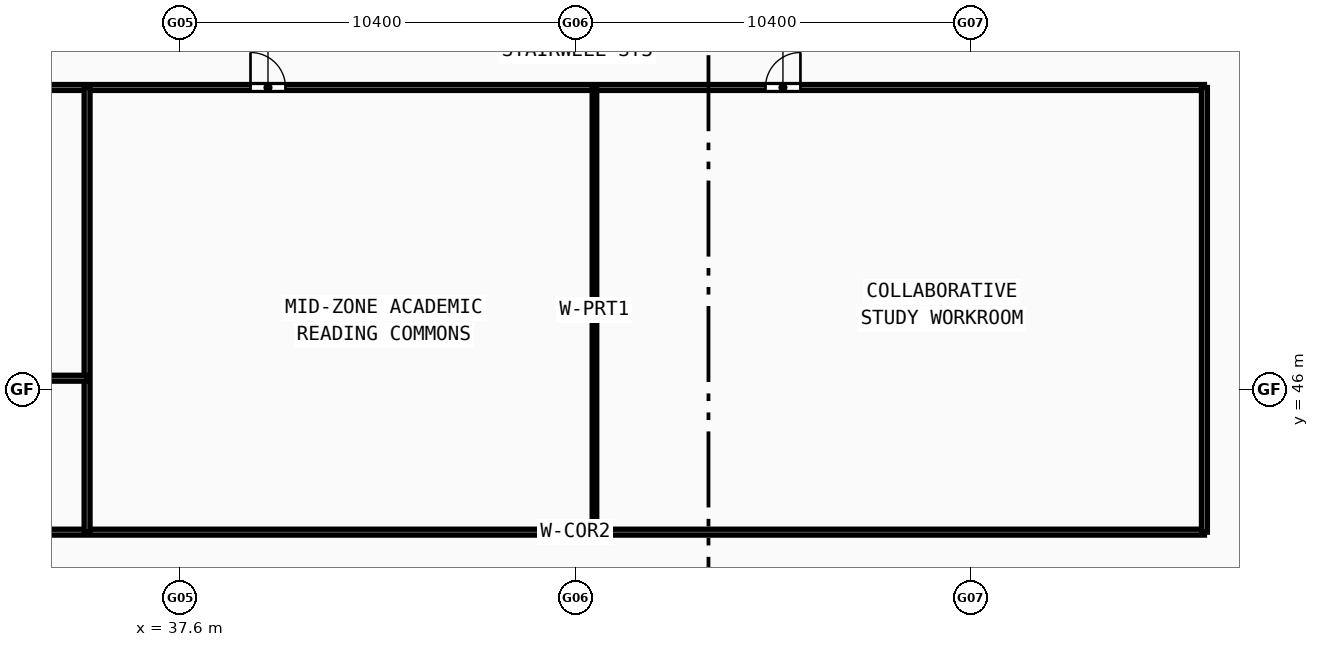
"""IFC4 building model, lengths in metres.
Left out: names, types, materials, properties, quantities, classifications, styles, units other than length and angle.
Written with IfcOpenShell. Run it as: python <this file> out.ifc"""

import sys

from ifc_helpers import new_model, si_unit, direction, frame, frame_2d, origin, origin_with_axes, place, context, subcontext, project, spatial, rectangle, extrude, source, transform, mapped, element, fill, save


model = new_model("IFC4")
c1 = context("Model", 3, precision=1e-05, world=origin(), true_north=direction((0.0, 1.0)))
c2 = subcontext(c1, "Body", "Model", "MODEL_VIEW")
j1 = project(units=[si_unit("LENGTHUNIT", "METRE"), si_unit("PLANEANGLEUNIT", "RADIAN")], contexts=[c1])
p1 = place(None, origin())
s1 = spatial("IfcSite", under=j1, at=p1, CompositionType="ELEMENT")
p2 = place(p1, origin())
s2 = spatial("IfcBuilding", under=s1, at=p2, CompositionType="ELEMENT")
p3 = place(p2, frame((0.0, 0.0, 188.56)))
s3 = spatial("IfcBuildingStorey", under=s2, at=p3, CompositionType="ELEMENT", Elevation=188.56)
p4 = place(p3, frame((31.45, 42.25, 0.0), z_axis=(0.0, 0.0, 1.0), x_axis=(1.0, 0.0, 0.0)))
e1 = element("IfcWall", 1, at=p4, inside=s3, PredefinedType="PARTITIONING", context=c2, shape_type="SweptSolid", body=[
    extrude(rectangle(XDim=33.1, YDim=0.155, at=frame_2d((16.55, 0.0))), origin(), (0.0, 0.0, 1.0), 2.89),
])
p5 = place(p3, frame((31.45, 53.95, 0.0), z_axis=(0.0, 0.0, 1.0), x_axis=(1.0, 0.0, 0.0)))
e2 = element("IfcWall", 2, at=p5, inside=s3, PredefinedType="PARTITIONING", context=c2, shape_type="SweptSolid", body=[
    extrude(rectangle(XDim=33.1, YDim=0.155, at=frame_2d((16.55, 0.0))), origin(), (0.0, 0.0, 1.0), 2.89),
])
p6 = place(p5, frame((8.0, 0.0, 0.0)))
e3 = element("IfcOpeningElement", 3, at=p6, cuts=e2, PredefinedType="OPENING", context=c2, shape_type="SweptSolid", body=[
    extrude(rectangle(XDim=0.92, YDim=2.1, at=frame_2d((0.46, 1.05))), frame((0.0, 0.087, 0.0), z_axis=(0.0, -1.0, 0.0), x_axis=(1.0, 0.0, 0.0)), (0.0, 0.0, 1.0), 0.175),
])
p7 = place(p5, frame((21.55, 0.0, 0.0)))
e4 = element("IfcOpeningElement", 4, at=p7, cuts=e2, PredefinedType="OPENING", context=c2, shape_type="SweptSolid", body=[
    extrude(rectangle(XDim=0.92, YDim=2.1, at=frame_2d((0.46, 1.05))), frame((0.0, 0.087, 0.0), z_axis=(0.0, -1.0, 0.0), x_axis=(1.0, 0.0, 0.0)), (0.0, 0.0, 1.0), 0.175),
])
for number, where, z_axis, x_axis in (
    (5, (64.55, 42.25, 0.0), (0.0, 0.0, 1.0), (0.0, 1.0, 0.0)),
    (6, (35.15, 42.25, 0.0), (0.0, 0.0, 1.0), (0.0, 1.0, 0.0)),
):
    element("IfcWall", number, at=place(p3, frame(where, z_axis=z_axis, x_axis=x_axis)), inside=s3, PredefinedType="PARTITIONING", context=c2, shape_type="SweptSolid", body=[
        extrude(rectangle(XDim=11.7, YDim=0.155, at=frame_2d((5.85, 0.0))), origin(), (0.0, 0.0, 1.0), 2.89),
    ])
p8 = place(p3, frame((31.45, 46.3, 0.0), z_axis=(0.0, 0.0, 1.0), x_axis=(1.0, 0.0, 0.0)))
e7 = element("IfcWall", 7, at=p8, inside=s3, PredefinedType="PARTITIONING", context=c2, shape_type="SweptSolid", body=[
    extrude(rectangle(XDim=3.7, YDim=0.155, at=frame_2d((1.85, 0.0))), origin(), (0.0, 0.0, 1.0), 2.89),
])
p9 = place(p3, frame((48.5, 42.25, 0.0), z_axis=(0.0, 0.0, 1.0), x_axis=(0.0, 1.0, 0.0)))
e8 = element("IfcWall", 8, at=p9, inside=s3, PredefinedType="PARTITIONING", context=c2, shape_type="SweptSolid", body=[
    extrude(rectangle(XDim=11.7, YDim=0.12, at=frame_2d((5.85, 0.0))), origin(), (0.0, 0.0, 1.0), 3.14),
])
m1 = source(origin(), c2, "Body", "SweptSolid", [
    extrude(rectangle(XDim=0.92, YDim=2.1, at=frame_2d((0.46, 1.05))), frame((0.0, 0.025, 0.0), z_axis=(0.0, -1.0, 0.0), x_axis=(1.0, 0.0, 0.0)), (0.0, 0.0, 1.0), 0.05),
])
p10 = place(p6, origin_with_axes())
e9 = element("IfcDoor", 9, at=p10, inside=s3, OperationType="SINGLE_SWING_LEFT", PredefinedType="DOOR", context=c2, shape_type="MappedRepresentation", body=[
    mapped(m1, transform((0.0, 0.0, 0.0), scale=1.0)),
])
fill(e3, e9)
p11 = place(p7, origin_with_axes())
e10 = element("IfcDoor", 10, at=p11, inside=s3, OperationType="SINGLE_SWING_RIGHT", PredefinedType="DOOR", context=c2, shape_type="MappedRepresentation", body=[
    mapped(m1, transform((0.0, 0.0, 0.0), scale=1.0)),
])
fill(e4, e10)
save(model, sys.argv[1])
